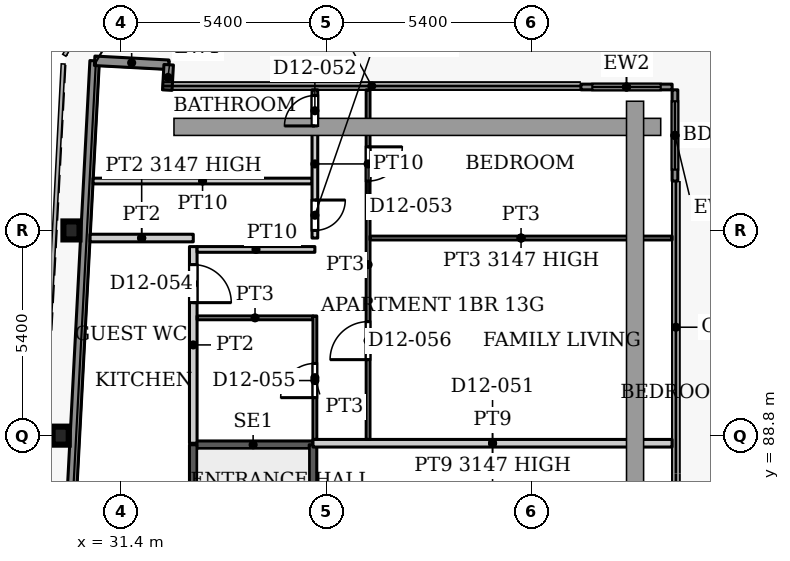
"""IFC4 building model, lengths in metres.
Left out: names, types, materials, properties, quantities, classifications, styles, units other than length and angle.
Written with IfcOpenShell. Run it as: python <this file> out.ifc"""

import sys

from ifc_helpers import new_model, si_unit, direction, frame, frame_2d, origin, origin_2d, place, context, subcontext, project, spatial, rectangle, i_section, extrude, source, transform, mapped, element, fill, save


model = new_model("IFC4")
c1 = context("Model", 3, precision=1e-05, world=origin(), true_north=direction((0.0, 1.0)))
c2 = subcontext(c1, "Body", "Model", "MODEL_VIEW")
j1 = project(units=[si_unit("LENGTHUNIT", "METRE"), si_unit("PLANEANGLEUNIT", "RADIAN")], contexts=[c1])
p1 = place(None, origin())
s1 = spatial("IfcSite", under=j1, at=p1, CompositionType="ELEMENT")
p2 = place(p1, origin())
s2 = spatial("IfcBuilding", under=s1, at=p2, CompositionType="ELEMENT")
p3 = place(p2, frame((0.0, 0.0, 57.8)))
s3 = spatial("IfcBuildingStorey", under=s2, at=p3, CompositionType="ELEMENT", Elevation=57.8)
for number, where, z_axis, x_axis in (
    (1, (29.811, 88.8, 0.0), (0.0, 0.0, 1.0), (1.0, 0.0, 0.0)),
    (2, (30.095, 94.2, 0.0), (0.0, 0.0, 1.0), (1.0, 0.0, 0.0)),
):
    element("IfcColumn", number, at=place(p3, frame(where, z_axis=z_axis, x_axis=x_axis)), inside=s3, PredefinedType="COLUMN", context=c2, shape_type="SweptSolid", body=[
        extrude(i_section(OverallWidth=0.424, OverallDepth=0.474, WebThickness=0.048, FlangeThickness=0.077, FilletRadius=0.014, at=origin_2d()), origin(), (0.0, 0.0, 1.0), 3.9),
    ])
p4 = place(p3, frame((27.195, 31.969, 0.0), z_axis=(0.0, 0.0, 1.0), x_axis=(0.052554995867, 0.998618031286, 0.0)))
e3 = element("IfcWall", 3, at=p4, inside=s3, PredefinedType="SOLIDWALL", context=c2, shape_type="SweptSolid", body=[
    extrude(rectangle(XDim=66.787, YDim=0.25, at=frame_2d((33.394, 0.0))), origin(), (0.0, 0.0, 1.0), 3.75),
])
p5 = place(p3, frame((30.705, 98.664, 0.0), z_axis=(0.0, 0.0, 1.0), x_axis=(0.998577785791, -0.053314216913, 0.0)))
e4 = element("IfcWall", 4, at=p5, inside=s3, PredefinedType="SOLIDWALL", context=c2, shape_type="SweptSolid", body=[
    extrude(rectangle(XDim=1.951, YDim=0.25, at=frame_2d((0.975, 0.0))), origin(), (0.0, 0.0, 1.0), 3.75),
])
p6 = place(p3, frame((32.653, 98.56, 0.0), z_axis=(0.0, 0.0, 1.0), x_axis=(-0.054093451632, -0.998535877418, 0.0)))
e5 = element("IfcWall", 5, at=p6, inside=s3, PredefinedType="SOLIDWALL", context=c2, shape_type="SweptSolid", body=[
    extrude(rectangle(XDim=0.668, YDim=0.25, at=frame_2d((0.334, 0.0))), origin(), (0.0, 0.0, 1.0), 3.75),
])
p7 = place(p3, frame((43.5, 97.975, 0.0), z_axis=(0.0, 0.0, 1.0), x_axis=(1.0, 0.0, 0.0)))
e6 = element("IfcWall", 6, at=p7, inside=s3, PredefinedType="SOLIDWALL", context=c2, shape_type="SweptSolid", body=[
    extrude(rectangle(XDim=2.4, YDim=0.15, at=frame_2d((1.2, 0.0))), origin(), (0.0, 0.0, 1.0), 3.75),
])
p8 = place(p7, frame((0.3, 0.0, 0.0)))
e7 = element("IfcOpeningElement", 7, at=p8, cuts=e6, PredefinedType="OPENING", context=c2, shape_type="SweptSolid", body=[
    extrude(rectangle(XDim=1.8, YDim=2.4, at=frame_2d((0.9, 1.2))), frame((0.0, 0.085, 0.0), z_axis=(0.0, -1.0, 0.0), x_axis=(1.0, 0.0, 0.0)), (0.0, 0.0, 1.0), 0.17),
])
p9 = place(p3, frame((45.975, 97.9, 0.0), z_axis=(0.0, 0.0, 1.0), x_axis=(0.0, -1.0, 0.0)))
e8 = element("IfcWall", 8, at=p9, inside=s3, PredefinedType="SOLIDWALL", context=c2, shape_type="SweptSolid", body=[
    extrude(rectangle(XDim=2.4, YDim=0.15, at=frame_2d((1.2, 0.0))), origin(), (0.0, 0.0, 1.0), 3.75),
])
p10 = place(p9, frame((0.3, 0.0, 0.0)))
e9 = element("IfcOpeningElement", 9, at=p10, cuts=e8, PredefinedType="OPENING", context=c2, shape_type="SweptSolid", body=[
    extrude(rectangle(XDim=1.8, YDim=2.4, at=frame_2d((0.9, 1.2))), frame((0.0, 0.085, 0.0), z_axis=(0.0, -1.0, 0.0), x_axis=(1.0, 0.0, 0.0)), (0.0, 0.0, 1.0), 0.17),
])
p11 = place(p3, frame((33.3, 88.56, 0.0), z_axis=(0.0, 0.0, 1.0), x_axis=(1.0, 0.0, 0.0)))
e10 = element("IfcWall", 10, at=p11, inside=s3, PredefinedType="SHEAR", context=c2, shape_type="SweptSolid", body=[
    extrude(rectangle(XDim=3.15, YDim=0.2, at=frame_2d((1.575, 0.0))), origin(), (0.0, 0.0, 1.0), 3.9),
])
p12 = place(p3, frame((33.3, 79.4, 0.0), z_axis=(0.0, 0.0, 1.0), x_axis=(0.0, 1.0, 0.0)))
e11 = element("IfcWall", 11, at=p12, inside=s3, PredefinedType="SHEAR", context=c2, shape_type="SweptSolid", body=[
    extrude(rectangle(XDim=9.16, YDim=0.2, at=frame_2d((4.58, 0.0))), origin(), (0.0, 0.0, 1.0), 3.9),
])
p13 = place(p12, frame((0.35, 0.0, 0.0)))
e12 = element("IfcOpeningElement", 12, at=p13, cuts=e11, PredefinedType="OPENING", context=c2, shape_type="SweptSolid", body=[
    extrude(rectangle(XDim=1.1, YDim=2.2, at=frame_2d((0.55, 1.1))), frame((0.0, 0.11, 0.0), z_axis=(0.0, -1.0, 0.0), x_axis=(1.0, 0.0, 0.0)), (0.0, 0.0, 1.0), 0.22),
])
p14 = place(p3, frame((36.45, 79.4, 0.0), z_axis=(0.0, 0.0, 1.0), x_axis=(0.0, 1.0, 0.0)))
e13 = element("IfcWall", 13, at=p14, inside=s3, PredefinedType="SHEAR", context=c2, shape_type="SweptSolid", body=[
    extrude(rectangle(XDim=9.16, YDim=0.2, at=frame_2d((4.58, 0.0))), origin(), (0.0, 0.0, 1.0), 3.9),
])
p15 = place(p3, frame((30.664, 95.5, 0.0), z_axis=(0.0, 0.0, 1.0), x_axis=(1.0, 0.0, 0.0)))
e14 = element("IfcWall", 14, at=p15, inside=s3, PredefinedType="PARTITIONING", context=c2, shape_type="SweptSolid", body=[
    extrude(rectangle(XDim=5.761, YDim=0.15, at=frame_2d((2.88, 0.0))), origin(), (0.0, 0.0, 1.0), 3.6),
])
p16 = place(p3, frame((30.585, 94.0, 0.0), z_axis=(0.0, 0.0, 1.0), x_axis=(1.0, 0.0, 0.0)))
e15 = element("IfcWall", 15, at=p16, inside=s3, PredefinedType="PARTITIONING", context=c2, shape_type="SweptSolid", body=[
    extrude(rectangle(XDim=2.715, YDim=0.2, at=frame_2d((1.358, 0.0))), origin(), (0.0, 0.0, 1.0), 3.147),
])
p17 = place(p3, frame((33.3, 88.6, 0.0), z_axis=(0.0, 0.0, 1.0), x_axis=(0.0, 1.0, 0.0)))
e16 = element("IfcWall", 16, at=p17, inside=s3, PredefinedType="PARTITIONING", context=c2, shape_type="SweptSolid", body=[
    extrude(rectangle(XDim=5.175, YDim=0.2, at=frame_2d((2.587, 0.0))), origin(), (0.0, 0.0, 1.0), 3.6),
])
p18 = place(p17, frame((3.7, 0.0, 0.0)))
e17 = element("IfcOpeningElement", 17, at=p18, cuts=e16, PredefinedType="OPENING", context=c2, shape_type="SweptSolid", body=[
    extrude(rectangle(XDim=1.0, YDim=2.1, at=frame_2d((0.5, 1.05))), frame((0.0, 0.11, 0.0), z_axis=(0.0, -1.0, 0.0), x_axis=(1.0, 0.0, 0.0)), (0.0, 0.0, 1.0), 0.22),
])
p19 = place(p3, frame((33.4, 91.9, 0.0), z_axis=(0.0, 0.0, 1.0), x_axis=(1.0, 0.0, 0.0)))
e18 = element("IfcWall", 18, at=p19, inside=s3, PredefinedType="PARTITIONING", context=c2, shape_type="SweptSolid", body=[
    extrude(rectangle(XDim=3.05, YDim=0.1, at=frame_2d((1.525, 0.0))), origin(), (0.0, 0.0, 1.0), 3.6),
])
p20 = place(p3, frame((33.4, 93.7, 0.0), z_axis=(0.0, 0.0, 1.0), x_axis=(1.0, 0.0, 0.0)))
e19 = element("IfcWall", 19, at=p20, inside=s3, PredefinedType="PARTITIONING", context=c2, shape_type="SweptSolid", body=[
    extrude(rectangle(XDim=3.1, YDim=0.15, at=frame_2d((1.55, 0.0))), origin(), (0.0, 0.0, 1.0), 3.6),
])
p21 = place(p3, frame((36.45, 88.6, 0.0), z_axis=(0.0, 0.0, 1.0), x_axis=(1.0, 0.0, 0.0)))
e20 = element("IfcWall", 20, at=p21, inside=s3, PredefinedType="PARTITIONING", context=c2, shape_type="SweptSolid", body=[
    extrude(rectangle(XDim=9.45, YDim=0.2, at=frame_2d((4.725, 0.0))), origin(), (0.0, 0.0, 1.0), 3.147),
])
p22 = place(p3, frame((36.5, 88.7, 0.0), z_axis=(0.0, 0.0, 1.0), x_axis=(0.0, 1.0, 0.0)))
e21 = element("IfcWall", 21, at=p22, inside=s3, PredefinedType="PARTITIONING", context=c2, shape_type="SweptSolid", body=[
    extrude(rectangle(XDim=3.25, YDim=0.1, at=frame_2d((1.625, 0.0))), origin(), (0.0, 0.0, 1.0), 3.6),
])
p23 = place(p22, frame((1.1, 0.0, 0.0)))
e22 = element("IfcOpeningElement", 22, at=p23, cuts=e21, PredefinedType="OPENING", context=c2, shape_type="SweptSolid", body=[
    extrude(rectangle(XDim=0.9, YDim=2.1, at=frame_2d((0.45, 1.05))), frame((0.0, 0.06, 0.0), z_axis=(0.0, -1.0, 0.0), x_axis=(1.0, 0.0, 0.0)), (0.0, 0.0, 1.0), 0.12),
])
p24 = place(p3, frame((36.5, 94.0, 0.0), z_axis=(0.0, 0.0, 1.0), x_axis=(0.0, 1.0, 0.0)))
e23 = element("IfcWall", 23, at=p24, inside=s3, PredefinedType="PARTITIONING", context=c2, shape_type="SweptSolid", body=[
    extrude(rectangle(XDim=3.9, YDim=0.15, at=frame_2d((1.95, 0.0))), origin(), (0.0, 0.0, 1.0), 3.6),
])
p25 = place(p24, frame((2.95, 0.0, 0.0)))
e24 = element("IfcOpeningElement", 24, at=p25, cuts=e23, PredefinedType="OPENING", context=c2, shape_type="SweptSolid", body=[
    extrude(rectangle(XDim=0.8, YDim=2.1, at=frame_2d((0.4, 1.05))), frame((0.0, 0.085, 0.0), z_axis=(0.0, -1.0, 0.0), x_axis=(1.0, 0.0, 0.0)), (0.0, 0.0, 1.0), 0.17),
])
p26 = place(p24, frame((0.2, 0.0, 0.0)))
e25 = element("IfcOpeningElement", 25, at=p26, cuts=e23, PredefinedType="OPENING", context=c2, shape_type="SweptSolid", body=[
    extrude(rectangle(XDim=0.8, YDim=2.1, at=frame_2d((0.4, 1.05))), frame((0.0, 0.085, 0.0), z_axis=(0.0, -1.0, 0.0), x_axis=(1.0, 0.0, 0.0)), (0.0, 0.0, 1.0), 0.17),
])
p27 = place(p3, frame((37.9, 88.7, 0.0), z_axis=(0.0, 0.0, 1.0), x_axis=(0.0, 1.0, 0.0)))
e26 = element("IfcWall", 26, at=p27, inside=s3, PredefinedType="PARTITIONING", context=c2, shape_type="SweptSolid", body=[
    extrude(rectangle(XDim=9.2, YDim=0.1, at=frame_2d((4.6, 0.0))), origin(), (0.0, 0.0, 1.0), 3.6),
])
p28 = place(p27, frame((6.8, 0.0, 0.0)))
e27 = element("IfcOpeningElement", 27, at=p28, cuts=e26, PredefinedType="OPENING", context=c2, shape_type="SweptSolid", body=[
    extrude(rectangle(XDim=0.9, YDim=2.1, at=frame_2d((0.45, 1.05))), frame((0.0, 0.06, 0.0), z_axis=(0.0, -1.0, 0.0), x_axis=(1.0, 0.0, 0.0)), (0.0, 0.0, 1.0), 0.12),
])
p29 = place(p27, frame((2.1, 0.0, 0.0)))
e28 = element("IfcOpeningElement", 28, at=p29, cuts=e26, PredefinedType="OPENING", context=c2, shape_type="SweptSolid", body=[
    extrude(rectangle(XDim=1.0, YDim=2.1, at=frame_2d((0.5, 1.05))), frame((0.0, 0.06, 0.0), z_axis=(0.0, -1.0, 0.0), x_axis=(1.0, 0.0, 0.0)), (0.0, 0.0, 1.0), 0.12),
])
p30 = place(p3, frame((37.95, 94.0, 0.0), z_axis=(0.0, 0.0, 1.0), x_axis=(1.0, 0.0, 0.0)))
e29 = element("IfcWall", 29, at=p30, inside=s3, PredefinedType="PARTITIONING", context=c2, shape_type="SweptSolid", body=[
    extrude(rectangle(XDim=7.95, YDim=0.1, at=frame_2d((3.975, 0.0))), origin(), (0.0, 0.0, 1.0), 3.147),
])
m1 = source(origin(), c2, "Body", "SweptSolid", [
    extrude(rectangle(XDim=1.8, YDim=2.4, at=frame_2d((0.9, 1.2))), frame((0.0, 0.025, 0.0), z_axis=(0.0, -1.0, 0.0), x_axis=(1.0, 0.0, 0.0)), (0.0, 0.0, 1.0), 0.05),
])
p31 = place(p8, origin())
e30 = element("IfcDoor", 30, at=p31, inside=s3, OperationType="SLIDING_TO_LEFT", PredefinedType="DOOR", context=c2, shape_type="MappedRepresentation", body=[
    mapped(m1, transform((0.0, 0.0, 0.0), x_axis=(1.0, 0.0, 0.0), y_axis=(0.0, 1.0, 0.0), z_axis=(0.0, 0.0, 1.0), scale=1.0)),
])
fill(e7, e30)
p32 = place(p10, origin())
e31 = element("IfcDoor", 31, at=p32, inside=s3, OperationType="SLIDING_TO_LEFT", PredefinedType="DOOR", context=c2, shape_type="MappedRepresentation", body=[
    mapped(m1, transform((0.0, 0.0, 0.0), x_axis=(1.0, 0.0, 0.0), y_axis=(0.0, 1.0, 0.0), z_axis=(0.0, 0.0, 1.0), scale=1.0)),
])
fill(e9, e31)
m2 = source(origin(), c2, "Body", "SweptSolid", [
    extrude(rectangle(XDim=0.8, YDim=2.1, at=frame_2d((0.4, 1.05))), frame((0.0, 0.025, 0.0), z_axis=(0.0, -1.0, 0.0), x_axis=(1.0, 0.0, 0.0)), (0.0, 0.0, 1.0), 0.05),
])
p33 = place(p25, origin())
e32 = element("IfcDoor", 32, at=p33, inside=s3, OperationType="SINGLE_SWING_LEFT", PredefinedType="DOOR", context=c2, shape_type="MappedRepresentation", body=[
    mapped(m2, transform((0.0, 0.0, 0.0), x_axis=(1.0, 0.0, 0.0), y_axis=(0.0, 1.0, 0.0), z_axis=(0.0, 0.0, 1.0), scale=1.0)),
])
fill(e24, e32)
m3 = source(origin(), c2, "Body", "SweptSolid", [
    extrude(rectangle(XDim=0.9, YDim=2.1, at=frame_2d((0.45, 1.05))), frame((0.0, 0.025, 0.0), z_axis=(0.0, -1.0, 0.0), x_axis=(1.0, 0.0, 0.0)), (0.0, 0.0, 1.0), 0.05),
])
p34 = place(p28, origin())
e33 = element("IfcDoor", 33, at=p34, inside=s3, OperationType="SINGLE_SWING_RIGHT", PredefinedType="DOOR", context=c2, shape_type="MappedRepresentation", body=[
    mapped(m3, transform((0.0, 0.0, 0.0), x_axis=(1.0, 0.0, 0.0), y_axis=(0.0, 1.0, 0.0), z_axis=(0.0, 0.0, 1.0), scale=1.0)),
])
fill(e27, e33)
m4 = source(origin(), c2, "Body", "SweptSolid", [
    extrude(rectangle(XDim=1.0, YDim=2.1, at=frame_2d((0.5, 1.05))), frame((0.0, 0.025, 0.0), z_axis=(0.0, -1.0, 0.0), x_axis=(1.0, 0.0, 0.0)), (0.0, 0.0, 1.0), 0.05),
])
p35 = place(p18, origin())
e34 = element("IfcDoor", 34, at=p35, inside=s3, OperationType="SINGLE_SWING_RIGHT", PredefinedType="DOOR", context=c2, shape_type="MappedRepresentation", body=[
    mapped(m4, transform((0.0, 0.0, 0.0), x_axis=(1.0, 0.0, 0.0), y_axis=(0.0, 1.0, 0.0), z_axis=(0.0, 0.0, 1.0), scale=1.0)),
])
fill(e17, e34)
p36 = place(p23, origin())
e35 = element("IfcDoor", 35, at=p36, inside=s3, OperationType="SINGLE_SWING_LEFT", PredefinedType="DOOR", context=c2, shape_type="MappedRepresentation", body=[
    mapped(m3, transform((0.0, 0.0, 0.0), x_axis=(1.0, 0.0, 0.0), y_axis=(0.0, 1.0, 0.0), z_axis=(0.0, 0.0, 1.0), scale=1.0)),
])
fill(e22, e35)
m5 = source(origin(), c2, "Body", "SweptSolid", [
    extrude(rectangle(XDim=1.0, YDim=2.1, at=frame_2d((0.5, 1.05))), frame((0.0, 0.025, 0.0), z_axis=(0.0, -1.0, 0.0), x_axis=(1.0, 0.0, 0.0)), (0.0, 0.0, 1.0), 0.05),
])
p37 = place(p29, origin())
e36 = element("IfcDoor", 36, at=p37, inside=s3, OperationType="SINGLE_SWING_LEFT", PredefinedType="DOOR", context=c2, shape_type="MappedRepresentation", body=[
    mapped(m5, transform((0.0, 0.0, 0.0), x_axis=(1.0, 0.0, 0.0), y_axis=(0.0, 1.0, 0.0), z_axis=(0.0, 0.0, 1.0), scale=1.0)),
])
fill(e28, e36)
p38 = place(p26, origin())
e37 = element("IfcDoor", 37, at=p38, inside=s3, OperationType="SINGLE_SWING_RIGHT", PredefinedType="DOOR", context=c2, shape_type="MappedRepresentation", body=[
    mapped(m2, transform((0.0, 0.0, 0.0), x_axis=(1.0, 0.0, 0.0), y_axis=(0.0, 1.0, 0.0), z_axis=(0.0, 0.0, 1.0), scale=1.0)),
])
fill(e25, e37)
save(model, sys.argv[1])
